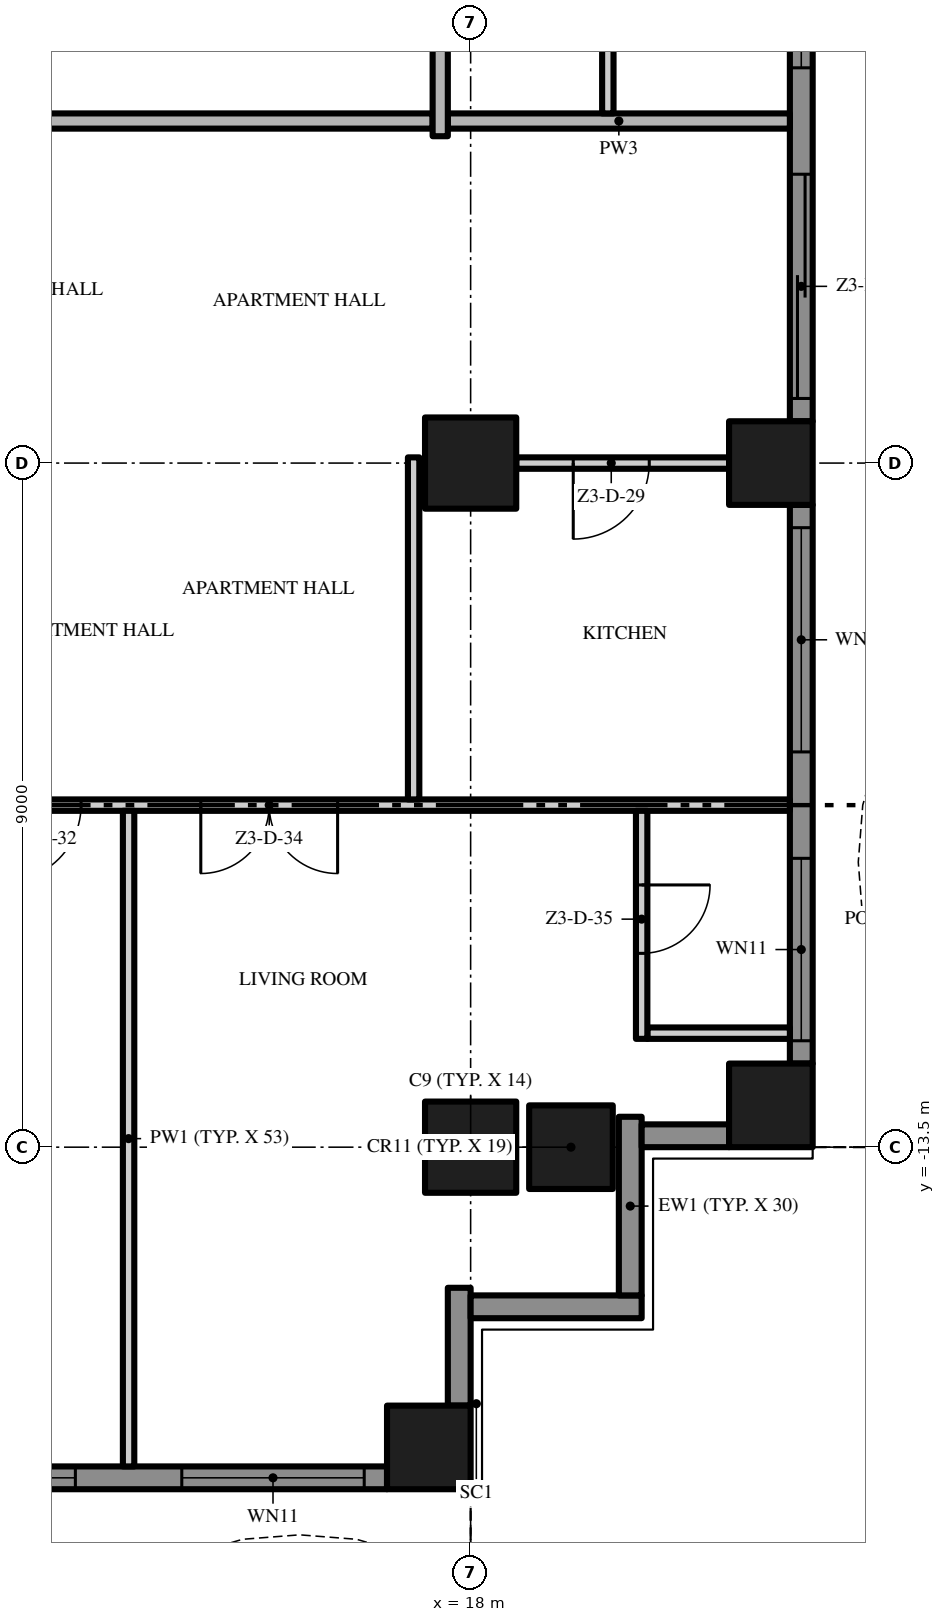
"""IFC4 building model, lengths in metres.
Left out: names, types, materials, properties, quantities, classifications, styles, units other than length and angle.
Written with IfcOpenShell. Run it as: python <this file> out.ifc"""

import sys

from ifc_helpers import new_model, si_unit, direction, frame, frame_2d, origin, origin_2d, place, context, subcontext, project, spatial, polyline, rectangle, outline, extrude, element, fill, save


model = new_model("IFC4")
c1 = context("Model", 3, precision=1e-05, world=origin(), true_north=direction((0.0, 1.0)))
c2 = subcontext(c1, "Body", "Model", "MODEL_VIEW")
j1 = project(units=[si_unit("LENGTHUNIT", "METRE"), si_unit("PLANEANGLEUNIT", "RADIAN")], contexts=[c1])
p1 = place(None, origin())
s1 = spatial("IfcSite", under=j1, at=p1, CompositionType="ELEMENT")
p2 = place(p1, origin())
s2 = spatial("IfcBuilding", under=s1, at=p2, CompositionType="ELEMENT")
p3 = place(p2, frame((0.0, 0.0, 159.2)))
s3 = spatial("IfcBuildingStorey", under=s2, at=p3, CompositionType="ELEMENT", Elevation=159.2)
p4 = place(p3, frame((18.0, -13.5, 0.0), z_axis=(0.0, 0.0, 1.0), x_axis=(1.0, 0.0, 0.0)))
e1 = element("IfcColumn", 1, at=p4, inside=s3, PredefinedType="COLUMN", context=c2, shape_type="SweptSolid", body=[
    extrude(rectangle(XDim=1.2, YDim=1.2, at=origin_2d()), origin(), (0.0, 0.0, 1.0), 3.5),
])
p5 = place(p3, frame((17.45, -17.45, 0.0), z_axis=(0.0, 0.0, 1.0), x_axis=(1.0, 0.0, 0.0)))
e2 = element("IfcColumn", 2, at=p5, inside=s3, PredefinedType="COLUMN", context=c2, shape_type="SweptSolid", body=[
    extrude(rectangle(XDim=1.1, YDim=1.1, at=origin_2d()), origin(), (0.0, 0.0, 1.0), 3.5),
])
p6 = place(p3, frame((18.0, -4.5, 0.0), z_axis=(0.0, 0.0, 1.0), x_axis=(1.0, 0.0, 0.0)))
e3 = element("IfcColumn", 3, at=p6, inside=s3, PredefinedType="COLUMN", context=c2, shape_type="SweptSolid", body=[
    extrude(rectangle(XDim=1.2, YDim=1.2, at=origin_2d()), origin(), (0.0, 0.0, 1.0), 3.5),
])
for number, where, z_axis, x_axis in (
    (4, (21.95, -12.95, 0.0), (0.0, 0.0, 1.0), (1.0, 0.0, 0.0)),
    (5, (19.32, -13.5, 0.0), (0.0, 0.0, 1.0), (1.0, 0.0, 0.0)),
    (6, (21.95, -4.5, 0.0), (0.0, 0.0, 1.0), (1.0, 0.0, 0.0)),
):
    element("IfcColumn", number, at=place(p3, frame(where, z_axis=z_axis, x_axis=x_axis)), inside=s3, PredefinedType="COLUMN", context=c2, shape_type="SweptSolid", body=[
        extrude(rectangle(XDim=1.1, YDim=1.1, at=origin_2d()), origin(), (0.0, 0.0, 1.0), 3.5),
    ])
p7 = place(p3, frame((16.9, -17.85, 0.0), z_axis=(0.0, 0.0, 1.0), x_axis=(-1.0, 0.0, 0.0)))
e7 = element("IfcWall", 7, at=p7, inside=s3, PredefinedType="SOLIDWALL", context=c2, shape_type="SweptSolid", body=[
    extrude(rectangle(XDim=7.35, YDim=0.3, at=frame_2d((3.675, 0.0))), origin(), (0.0, 0.0, 1.0), 3.5),
])
p8 = place(p7, frame((4.1, 0.0, 0.45)))
e8 = element("IfcOpeningElement", 8, at=p8, cuts=e7, PredefinedType="OPENING", context=c2, shape_type="SweptSolid", body=[
    extrude(rectangle(XDim=2.95, YDim=2.65, at=frame_2d((1.475, 1.325))), frame((0.0, 0.16, 0.0), z_axis=(0.0, -1.0, 0.0), x_axis=(1.0, 0.0, 0.0)), (0.0, 0.0, 1.0), 0.32),
])
p9 = place(p7, frame((0.3, 0.0, 0.45)))
e9 = element("IfcOpeningElement", 9, at=p9, cuts=e7, PredefinedType="OPENING", context=c2, shape_type="SweptSolid", body=[
    extrude(rectangle(XDim=2.4, YDim=2.65, at=frame_2d((1.2, 1.325))), frame((0.0, 0.16, 0.0), z_axis=(0.0, -1.0, 0.0), x_axis=(1.0, 0.0, 0.0)), (0.0, 0.0, 1.0), 0.32),
])
p10 = place(p3, frame((17.85, -15.35, 0.0), z_axis=(0.0, 0.0, 1.0), x_axis=(0.0, -1.0, 0.0)))
e10 = element("IfcWall", 10, at=p10, inside=s3, PredefinedType="SOLIDWALL", context=c2, shape_type="SweptSolid", body=[
    extrude(rectangle(XDim=1.55, YDim=0.3, at=frame_2d((0.775, 0.0))), origin(), (0.0, 0.0, 1.0), 3.5),
])
p11 = place(p3, frame((20.25, -15.6, 0.0), z_axis=(0.0, 0.0, 1.0), x_axis=(-1.0, 0.0, 0.0)))
e11 = element("IfcWall", 11, at=p11, inside=s3, PredefinedType="SOLIDWALL", context=c2, shape_type="SweptSolid", body=[
    extrude(rectangle(XDim=2.25, YDim=0.3, at=frame_2d((1.125, 0.0))), origin(), (0.0, 0.0, 1.0), 3.5),
])
p12 = place(p3, frame((20.1, -13.1, 0.0), z_axis=(0.0, 0.0, 1.0), x_axis=(0.0, -1.0, 0.0)))
e12 = element("IfcWall", 12, at=p12, inside=s3, PredefinedType="SOLIDWALL", context=c2, shape_type="SweptSolid", body=[
    extrude(rectangle(XDim=2.35, YDim=0.3, at=frame_2d((1.175, 0.0))), origin(), (0.0, 0.0, 1.0), 3.5),
])
p13 = place(p3, frame((21.4, -13.35, 0.0), z_axis=(0.0, 0.0, 1.0), x_axis=(-1.0, 0.0, 0.0)))
e13 = element("IfcWall", 13, at=p13, inside=s3, PredefinedType="SOLIDWALL", context=c2, shape_type="SweptSolid", body=[
    extrude(rectangle(XDim=1.15, YDim=0.3, at=frame_2d((0.575, 0.0))), origin(), (0.0, 0.0, 1.0), 3.5),
])
p14 = place(p3, frame((22.35, -5.05, 0.0), z_axis=(0.0, 0.0, 1.0), x_axis=(0.0, -1.0, 0.0)))
e14 = element("IfcWall", 14, at=p14, inside=s3, PredefinedType="SOLIDWALL", context=c2, shape_type="SweptSolid", body=[
    extrude(rectangle(XDim=7.35, YDim=0.3, at=frame_2d((3.675, 0.0))), origin(), (0.0, 0.0, 1.0), 3.5),
])
p15 = place(p14, frame((4.65, 0.0, 0.45)))
e15 = element("IfcOpeningElement", 15, at=p15, cuts=e14, PredefinedType="OPENING", context=c2, shape_type="SweptSolid", body=[
    extrude(rectangle(XDim=2.4, YDim=2.65, at=frame_2d((1.2, 1.325))), frame((0.0, 0.16, 0.0), z_axis=(0.0, -1.0, 0.0), x_axis=(1.0, 0.0, 0.0)), (0.0, 0.0, 1.0), 0.32),
])
p16 = place(p14, frame((0.3, 0.0, 0.45)))
e16 = element("IfcOpeningElement", 16, at=p16, cuts=e14, PredefinedType="OPENING", context=c2, shape_type="SweptSolid", body=[
    extrude(rectangle(XDim=2.95, YDim=2.65, at=frame_2d((1.475, 1.325))), frame((0.0, 0.16, 0.0), z_axis=(0.0, -1.0, 0.0), x_axis=(1.0, 0.0, 0.0)), (0.0, 0.0, 1.0), 0.32),
])
p17 = place(p3, frame((22.35, 3.95, 0.0), z_axis=(0.0, 0.0, 1.0), x_axis=(0.0, -1.0, 0.0)))
e17 = element("IfcWall", 17, at=p17, inside=s3, PredefinedType="SOLIDWALL", context=c2, shape_type="SweptSolid", body=[
    extrude(rectangle(XDim=7.9, YDim=0.3, at=frame_2d((3.95, 0.0))), origin(), (0.0, 0.0, 1.0), 3.5),
])
p18 = place(p17, frame((4.65, 0.0, 0.0)))
e18 = element("IfcOpeningElement", 18, at=p18, cuts=e17, PredefinedType="OPENING", context=c2, shape_type="SweptSolid", body=[
    extrude(rectangle(XDim=2.95, YDim=2.4, at=frame_2d((1.475, 1.2))), frame((0.0, 0.16, 0.0), z_axis=(0.0, -1.0, 0.0), x_axis=(1.0, 0.0, 0.0)), (0.0, 0.0, 1.0), 0.32),
])
p19 = place(p17, frame((0.3, 0.0, 0.45)))
e19 = element("IfcOpeningElement", 19, at=p19, cuts=e17, PredefinedType="OPENING", context=c2, shape_type="SweptSolid", body=[
    extrude(rectangle(XDim=2.95, YDim=2.65, at=frame_2d((1.475, 1.325))), frame((0.0, 0.16, 0.0), z_axis=(0.0, -1.0, 0.0), x_axis=(1.0, 0.0, 0.0)), (0.0, 0.0, 1.0), 0.32),
])
p20 = place(p3, origin())
e20 = element("IfcWall", 20, at=p20, inside=s3, PredefinedType="USERDEFINED", context=c2, shape_type="SweptSolid", body=[
    extrude(outline(polyline([(-18.0, -19.8), (-16.5, -19.095), (-15.0, -18.659), (-14.25, -18.6), (-13.5, -18.659), (-12.0, -19.095), (-10.5, -19.8), (-9.0, -20.505), (-7.5, -20.941), (-6.75, -21.0), (-6.0, -20.941), (-4.5, -20.505), (-3.0, -19.8), (-1.5, -19.095), (0.0, -18.659), (0.75, -18.6), (1.5, -18.659), (3.0, -19.095), (4.5, -19.8), (6.0, -20.505), (7.5, -20.941), (8.25, -21.0), (9.0, -20.941), (10.5, -20.505), (12.0, -19.8), (13.5, -19.095), (15.0, -18.659), (15.75, -18.6), (16.5, -18.659), (18.0, -19.095), (18.07, -18.855), (16.545, -18.411), (15.75, -18.349), (14.955, -18.411), (13.411, -18.86), (11.894, -19.574), (10.411, -20.271), (8.955, -20.694), (8.25, -20.749), (7.545, -20.694), (6.089, -20.271), (4.606, -19.574), (3.089, -18.86), (1.545, -18.411), (0.75, -18.349), (-0.045, -18.411), (-1.589, -18.86), (-3.106, -19.574), (-4.589, -20.271), (-6.045, -20.694), (-6.75, -20.749), (-7.455, -20.694), (-8.911, -20.271), (-10.394, -19.574), (-11.911, -18.86), (-13.455, -18.411), (-14.25, -18.349), (-15.045, -18.411), (-16.589, -18.86), (-18.106, -19.574), (-18.0, -19.8)])), origin(), (0.0, 0.0, 1.0), 0.9),
])
p21 = place(p3, origin())
e21 = element("IfcWall", 21, at=p21, inside=s3, PredefinedType="USERDEFINED", context=c2, shape_type="SweptSolid", body=[
    extrude(outline(polyline([(24.3, -13.5), (23.595, -12.0), (23.159, -10.5), (23.1, -9.75), (23.159, -9.0), (23.595, -7.5), (24.3, -6.0), (25.005, -4.5), (25.441, -3.0), (25.5, -2.25), (25.441, -1.5), (25.005, 0.0), (24.3, 1.5), (23.595, 3.0), (23.159, 4.5), (23.1, 5.25), (23.159, 6.0), (23.595, 7.5), (24.3, 9.0), (25.005, 10.5), (25.441, 12.0), (25.5, 12.75), (25.441, 13.5), (25.005, 15.0), (24.3, 16.5), (23.595, 18.0), (23.368, 17.894), (24.074, 16.394), (24.771, 14.911), (25.194, 13.455), (25.249, 12.75), (25.194, 12.045), (24.771, 10.589), (24.074, 9.106), (23.36, 7.589), (22.911, 6.045), (22.849, 5.25), (22.911, 4.455), (23.36, 2.911), (24.074, 1.394), (24.771, -0.089), (25.194, -1.545), (25.249, -2.25), (25.194, -2.955), (24.771, -4.411), (24.074, -5.894), (23.36, -7.411), (22.911, -8.955), (22.849, -9.75), (22.911, -10.545), (23.36, -12.089), (24.074, -13.606), (24.3, -13.5)])), origin(), (0.0, 0.0, 1.0), 0.9),
])
p22 = place(p3, frame((20.325, -12.0, 0.0), z_axis=(0.0, 0.0, 1.0), x_axis=(1.0, 0.0, 0.0)))
e22 = element("IfcWall", 22, at=p22, inside=s3, PredefinedType="PARTITIONING", context=c2, shape_type="SweptSolid", body=[
    extrude(rectangle(XDim=1.875, YDim=0.15, at=frame_2d((0.938, 0.0))), origin(), (0.0, 0.0, 1.0), 3.5),
])
p23 = place(p3, frame((22.2, -9.0, 0.0), z_axis=(0.0, 0.0, 1.0), x_axis=(-1.0, 0.0, 0.0)))
e23 = element("IfcWall", 23, at=p23, inside=s3, PredefinedType="PARTITIONING", context=c2, shape_type="SweptSolid", body=[
    extrude(rectangle(XDim=10.875, YDim=0.15, at=frame_2d((5.438, 0.0))), origin(), (0.0, 0.0, 1.0), 3.5),
])
p24 = place(p23, frame((9.325, 0.0, 0.0)))
e24 = element("IfcOpeningElement", 24, at=p24, cuts=e23, PredefinedType="OPENING", context=c2, shape_type="SweptSolid", body=[
    extrude(rectangle(XDim=1.0, YDim=2.4, at=frame_2d((0.5, 1.2))), frame((0.0, 0.085, 0.0), z_axis=(0.0, -1.0, 0.0), x_axis=(1.0, 0.0, 0.0)), (0.0, 0.0, 1.0), 0.17),
])
p25 = place(p23, frame((5.95, 0.0, 0.0)))
e25 = element("IfcOpeningElement", 25, at=p25, cuts=e23, PredefinedType="OPENING", context=c2, shape_type="SweptSolid", body=[
    extrude(rectangle(XDim=1.8, YDim=2.4, at=frame_2d((0.9, 1.2))), frame((0.0, 0.085, 0.0), z_axis=(0.0, -1.0, 0.0), x_axis=(1.0, 0.0, 0.0)), (0.0, 0.0, 1.0), 0.17),
])
p26 = place(p3, frame((21.4, -4.5, 0.0), z_axis=(0.0, 0.0, 1.0), x_axis=(-1.0, 0.0, 0.0)))
e26 = element("IfcWall", 26, at=p26, inside=s3, PredefinedType="PARTITIONING", context=c2, shape_type="SweptSolid", body=[
    extrude(rectangle(XDim=2.8, YDim=0.15, at=frame_2d((1.4, 0.0))), origin(), (0.0, 0.0, 1.0), 3.5),
])
p27 = place(p26, frame((1.05, 0.0, 0.0)))
e27 = element("IfcOpeningElement", 27, at=p27, cuts=e26, PredefinedType="OPENING", context=c2, shape_type="SweptSolid", body=[
    extrude(rectangle(XDim=1.0, YDim=2.4, at=frame_2d((0.5, 1.2))), frame((0.0, 0.085, 0.0), z_axis=(0.0, -1.0, 0.0), x_axis=(1.0, 0.0, 0.0)), (0.0, 0.0, 1.0), 0.17),
])
p28 = place(p3, frame((17.5, 0.0, 0.0), z_axis=(0.0, 0.0, 1.0), x_axis=(-1.0, 0.0, 0.0)))
e28 = element("IfcWall", 28, at=p28, inside=s3, PredefinedType="PARTITIONING", context=c2, shape_type="SweptSolid", body=[
    extrude(rectangle(XDim=35.0, YDim=0.2, at=frame_2d((17.5, 0.0))), origin(), (0.0, 0.0, 1.0), 3.5),
])
p29 = place(p28, frame((23.5, 0.0, 0.0)))
e29 = element("IfcOpeningElement", 29, at=p29, cuts=e28, PredefinedType="OPENING", context=c2, shape_type="SweptSolid", body=[
    extrude(rectangle(XDim=1.5, YDim=2.4, at=frame_2d((0.75, 1.2))), frame((0.0, 0.11, 0.0), z_axis=(0.0, -1.0, 0.0), x_axis=(1.0, 0.0, 0.0)), (0.0, 0.0, 1.0), 0.22),
])
p30 = place(p28, frame((5.5, 0.0, 0.0)))
e30 = element("IfcOpeningElement", 30, at=p30, cuts=e28, PredefinedType="OPENING", context=c2, shape_type="SweptSolid", body=[
    extrude(rectangle(XDim=1.5, YDim=2.4, at=frame_2d((0.75, 1.2))), frame((0.0, 0.11, 0.0), z_axis=(0.0, -1.0, 0.0), x_axis=(1.0, 0.0, 0.0)), (0.0, 0.0, 1.0), 0.22),
])
p31 = place(p3, frame((17.7, 0.0, 0.0), z_axis=(0.0, 0.0, 1.0), x_axis=(1.0, 0.0, 0.0)))
e31 = element("IfcWall", 31, at=p31, inside=s3, PredefinedType="PARTITIONING", context=c2, shape_type="SweptSolid", body=[
    extrude(rectangle(XDim=4.5, YDim=0.2, at=frame_2d((2.25, 0.0))), origin(), (0.0, 0.0, 1.0), 3.5),
])
p32 = place(p3, frame((13.5, -17.7, 0.0), z_axis=(0.0, 0.0, 1.0), x_axis=(0.0, 1.0, 0.0)))
e32 = element("IfcWall", 32, at=p32, inside=s3, PredefinedType="PARTITIONING", context=c2, shape_type="SweptSolid", body=[
    extrude(rectangle(XDim=8.625, YDim=0.15, at=frame_2d((4.312, 0.0))), origin(), (0.0, 0.0, 1.0), 3.5),
])
p33 = place(p3, frame((17.25, -8.925, 0.0), z_axis=(0.0, 0.0, 1.0), x_axis=(0.0, 1.0, 0.0)))
e33 = element("IfcWall", 33, at=p33, inside=s3, PredefinedType="PARTITIONING", context=c2, shape_type="SweptSolid", body=[
    extrude(rectangle(XDim=4.5, YDim=0.15, at=frame_2d((2.25, 0.0))), origin(), (0.0, 0.0, 1.0), 3.5),
])
p34 = place(p3, frame((17.6, -0.2, 0.0), z_axis=(0.0, 0.0, 1.0), x_axis=(0.0, 1.0, 0.0)))
e34 = element("IfcWall", 34, at=p34, inside=s3, PredefinedType="PARTITIONING", context=c2, shape_type="SweptSolid", body=[
    extrude(rectangle(XDim=4.1, YDim=0.2, at=frame_2d((2.05, 0.0))), origin(), (0.0, 0.0, 1.0), 3.5),
])
p35 = place(p3, frame((19.805, 0.1, 0.0), z_axis=(0.0, 0.0, 1.0), x_axis=(0.0, 1.0, 0.0)))
e35 = element("IfcWall", 35, at=p35, inside=s3, PredefinedType="PARTITIONING", context=c2, shape_type="SweptSolid", body=[
    extrude(rectangle(XDim=2.225, YDim=0.15, at=frame_2d((1.113, 0.0))), origin(), (0.0, 0.0, 1.0), 3.5),
])
p36 = place(p3, frame((20.25, -9.075, 0.0), z_axis=(0.0, 0.0, 1.0), x_axis=(0.0, -1.0, 0.0)))
e36 = element("IfcWall", 36, at=p36, inside=s3, PredefinedType="PARTITIONING", context=c2, shape_type="SweptSolid", body=[
    extrude(rectangle(XDim=3.0, YDim=0.15, at=frame_2d((1.5, 0.0))), origin(), (0.0, 0.0, 1.0), 3.5),
])
p37 = place(p36, frame((0.975, 0.0, 0.0)))
e37 = element("IfcOpeningElement", 37, at=p37, cuts=e36, PredefinedType="OPENING", context=c2, shape_type="SweptSolid", body=[
    extrude(rectangle(XDim=0.9, YDim=2.1, at=frame_2d((0.45, 1.05))), frame((0.0, 0.085, 0.0), z_axis=(0.0, -1.0, 0.0), x_axis=(1.0, 0.0, 0.0)), (0.0, 0.0, 1.0), 0.17),
])
p38 = place(p8, origin())
e38 = element("IfcWindow", 38, at=p38, inside=s3, PartitioningType="SINGLE_PANEL", PredefinedType="WINDOW", context=c2, shape_type="SweptSolid", body=[
    extrude(rectangle(XDim=2.95, YDim=2.65, at=frame_2d((1.475, 1.325))), frame((0.0, 0.03, 0.0), z_axis=(0.0, -1.0, 0.0), x_axis=(1.0, 0.0, 0.0)), (0.0, 0.0, 1.0), 0.06),
])
fill(e8, e38)
p39 = place(p9, origin())
e39 = element("IfcWindow", 39, at=p39, inside=s3, PartitioningType="SINGLE_PANEL", PredefinedType="WINDOW", context=c2, shape_type="SweptSolid", body=[
    extrude(rectangle(XDim=2.4, YDim=2.65, at=frame_2d((1.2, 1.325))), frame((0.0, 0.03, 0.0), z_axis=(0.0, -1.0, 0.0), x_axis=(1.0, 0.0, 0.0)), (0.0, 0.0, 1.0), 0.06),
])
fill(e9, e39)
p40 = place(p15, origin())
e40 = element("IfcWindow", 40, at=p40, inside=s3, PartitioningType="SINGLE_PANEL", PredefinedType="WINDOW", context=c2, shape_type="SweptSolid", body=[
    extrude(rectangle(XDim=2.4, YDim=2.65, at=frame_2d((1.2, 1.325))), frame((0.0, 0.03, 0.0), z_axis=(0.0, -1.0, 0.0), x_axis=(1.0, 0.0, 0.0)), (0.0, 0.0, 1.0), 0.06),
])
fill(e15, e40)
p41 = place(p16, origin())
e41 = element("IfcWindow", 41, at=p41, inside=s3, PartitioningType="SINGLE_PANEL", PredefinedType="WINDOW", context=c2, shape_type="SweptSolid", body=[
    extrude(rectangle(XDim=2.95, YDim=2.65, at=frame_2d((1.475, 1.325))), frame((0.0, 0.03, 0.0), z_axis=(0.0, -1.0, 0.0), x_axis=(1.0, 0.0, 0.0)), (0.0, 0.0, 1.0), 0.06),
])
fill(e16, e41)
p42 = place(p18, origin())
e42 = element("IfcDoor", 42, at=p42, inside=s3, OperationType="SINGLE_SWING_LEFT", PredefinedType="DOOR", context=c2, shape_type="SweptSolid", body=[
    extrude(rectangle(XDim=2.95, YDim=2.4, at=frame_2d((1.475, 1.2))), frame((0.0, 0.025, 0.0), z_axis=(0.0, -1.0, 0.0), x_axis=(1.0, 0.0, 0.0)), (0.0, 0.0, 1.0), 0.05),
])
fill(e18, e42)
p43 = place(p19, origin())
e43 = element("IfcWindow", 43, at=p43, inside=s3, PartitioningType="SINGLE_PANEL", PredefinedType="WINDOW", context=c2, shape_type="SweptSolid", body=[
    extrude(rectangle(XDim=2.95, YDim=2.65, at=frame_2d((1.475, 1.325))), frame((0.0, 0.03, 0.0), z_axis=(0.0, -1.0, 0.0), x_axis=(1.0, 0.0, 0.0)), (0.0, 0.0, 1.0), 0.06),
])
fill(e19, e43)
p44 = place(p27, origin())
e44 = element("IfcDoor", 44, at=p44, inside=s3, OperationType="SINGLE_SWING_RIGHT", PredefinedType="DOOR", context=c2, shape_type="SweptSolid", body=[
    extrude(rectangle(XDim=1.0, YDim=2.4, at=frame_2d((0.5, 1.2))), frame((0.0, 0.025, 0.0), z_axis=(0.0, -1.0, 0.0), x_axis=(1.0, 0.0, 0.0)), (0.0, 0.0, 1.0), 0.05),
])
fill(e27, e44)
p45 = place(p24, origin())
e45 = element("IfcDoor", 45, at=p45, inside=s3, OperationType="SINGLE_SWING_RIGHT", PredefinedType="DOOR", context=c2, shape_type="SweptSolid", body=[
    extrude(rectangle(XDim=1.0, YDim=2.4, at=frame_2d((0.5, 1.2))), frame((0.0, 0.025, 0.0), z_axis=(0.0, -1.0, 0.0), x_axis=(1.0, 0.0, 0.0)), (0.0, 0.0, 1.0), 0.05),
])
fill(e24, e45)
p46 = place(p25, origin())
e46 = element("IfcDoor", 46, at=p46, inside=s3, OperationType="DOUBLE_DOOR_SINGLE_SWING", PredefinedType="DOOR", context=c2, shape_type="SweptSolid", body=[
    extrude(rectangle(XDim=1.8, YDim=2.4, at=frame_2d((0.9, 1.2))), frame((0.0, 0.025, 0.0), z_axis=(0.0, -1.0, 0.0), x_axis=(1.0, 0.0, 0.0)), (0.0, 0.0, 1.0), 0.05),
])
fill(e25, e46)
p47 = place(p37, origin())
e47 = element("IfcDoor", 47, at=p47, inside=s3, OperationType="SINGLE_SWING_LEFT", PredefinedType="DOOR", context=c2, shape_type="SweptSolid", body=[
    extrude(rectangle(XDim=0.9, YDim=2.1, at=frame_2d((0.45, 1.05))), frame((0.0, 0.025, 0.0), z_axis=(0.0, -1.0, 0.0), x_axis=(1.0, 0.0, 0.0)), (0.0, 0.0, 1.0), 0.05),
])
fill(e37, e47)
save(model, sys.argv[1])
